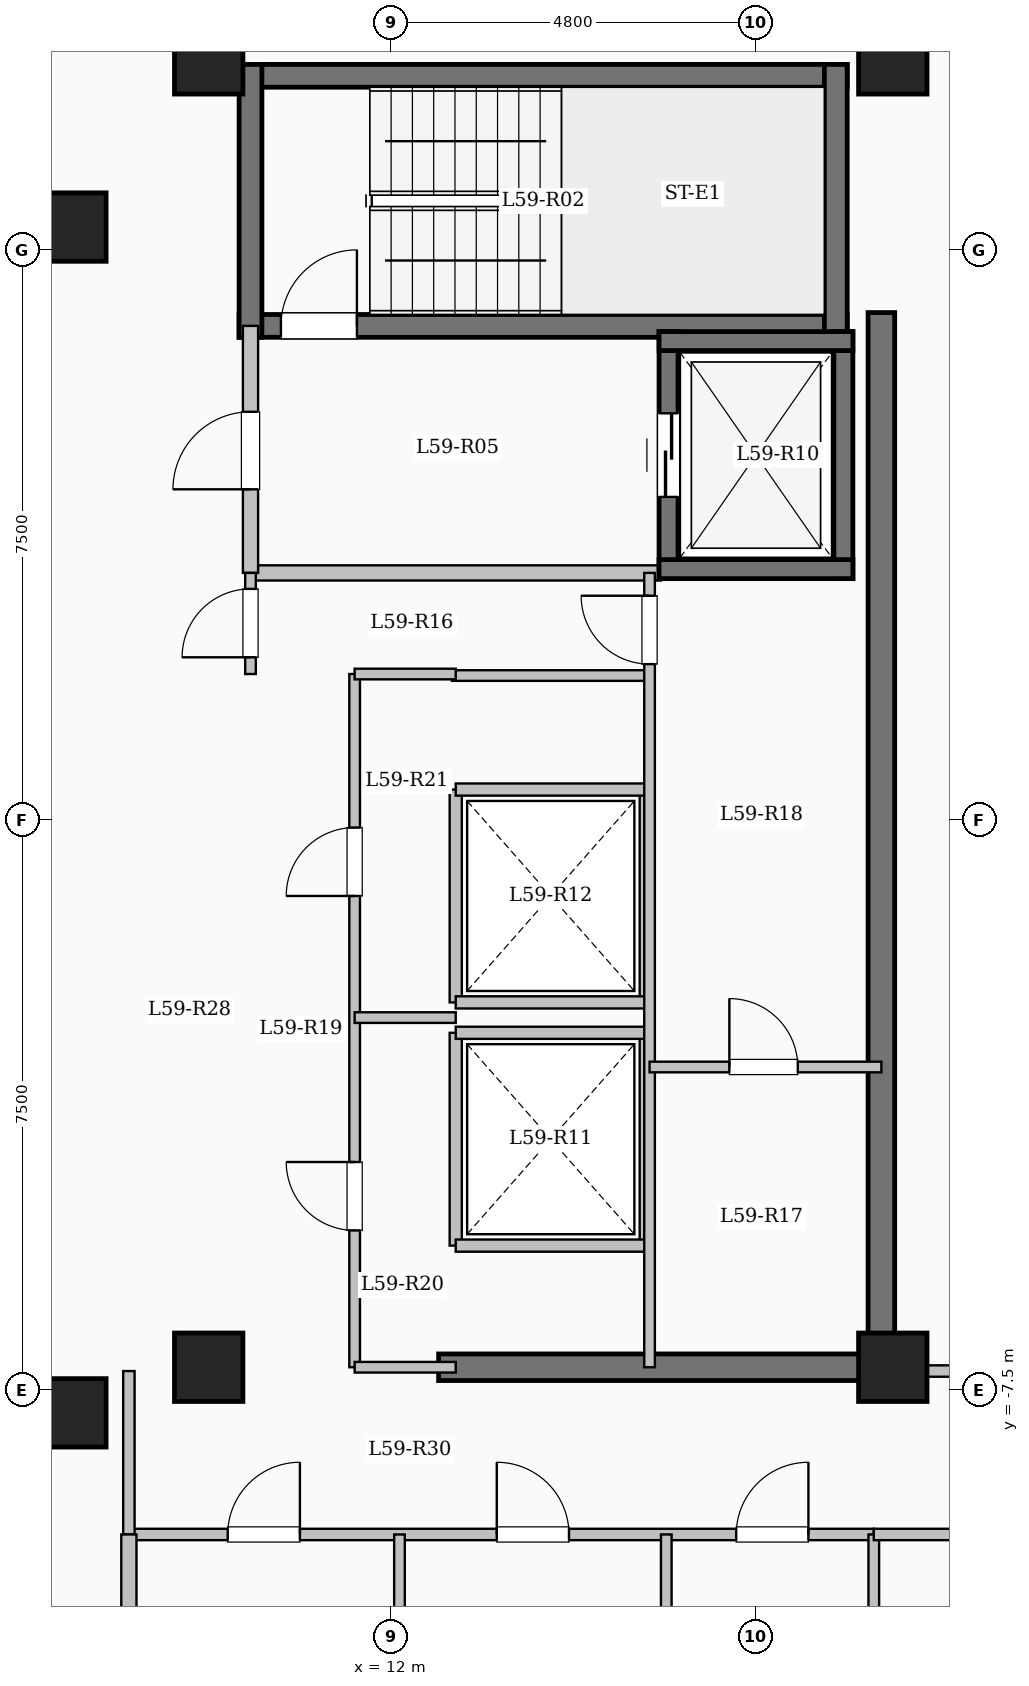
"""IFC4 building model, lengths in metres.
Left out: names, types, materials, properties, quantities, classifications, styles, units other than length and angle.
Written with IfcOpenShell. Run it as: python <this file> out.ifc"""

import sys

from ifc_helpers import new_model, si_unit, direction, frame, frame_2d, origin, origin_2d, place, context, subcontext, project, spatial, rectangle, extrude, element, fill, save


model = new_model("IFC4")
c1 = context("Model", 3, precision=1e-05, world=origin(), true_north=direction((0.0, 1.0)))
c2 = subcontext(c1, "Body", "Model", "MODEL_VIEW")
j1 = project(units=[si_unit("LENGTHUNIT", "METRE"), si_unit("PLANEANGLEUNIT", "RADIAN")], contexts=[c1])
p1 = place(None, origin())
s1 = spatial("IfcSite", under=j1, at=p1, CompositionType="ELEMENT")
p2 = place(p1, origin())
s2 = spatial("IfcBuilding", under=s1, at=p2, CompositionType="ELEMENT")
p3 = place(p2, frame((0.0, 0.0, 217.05)))
s3 = spatial("IfcBuildingStorey", under=s2, at=p3, CompositionType="ELEMENT", Elevation=217.05)
for number, where, z_axis, x_axis in (
    (1, (7.8, -7.8, 0.0), (0.0, 0.0, 1.0), (1.0, 0.0, 0.0)),
    (2, (7.8, 7.8, 0.0), (0.0, 0.0, 1.0), (1.0, 0.0, 0.0)),
    (3, (9.6, -7.2, 0.0), (0.0, 0.0, 1.0), (1.0, 0.0, 0.0)),
    (4, (9.6, 10.0, 0.0), (0.0, 0.0, 1.0), (1.0, 0.0, 0.0)),
    (5, (18.6, -7.2, 0.0), (0.0, 0.0, 1.0), (1.0, 0.0, 0.0)),
    (6, (18.6, 10.0, 0.0), (0.0, 0.0, 1.0), (1.0, 0.0, 0.0)),
):
    element("IfcColumn", number, at=place(p3, frame(where, z_axis=z_axis, x_axis=x_axis)), inside=s3, PredefinedType="COLUMN", context=c2, shape_type="SweptSolid", body=[
        extrude(rectangle(XDim=0.9, YDim=0.9, at=origin_2d()), origin(), (0.0, 0.0, 1.0), 3.35),
    ])
p4 = place(p3, frame((10.0, 9.79, 0.0), z_axis=(0.0, 0.0, 1.0), x_axis=(1.0, 0.0, 0.0)))
e7 = element("IfcWall", 7, at=p4, inside=s3, PredefinedType="SHEAR", context=c2, shape_type="SweptSolid", body=[
    extrude(rectangle(XDim=8.0, YDim=0.3, at=frame_2d((4.0, 0.0))), origin(), (0.0, 0.0, 1.0), 3.35),
])
p5 = place(p3, frame((10.0, 6.5, 0.0), z_axis=(0.0, 0.0, 1.0), x_axis=(1.0, 0.0, 0.0)))
e8 = element("IfcWall", 8, at=p5, inside=s3, PredefinedType="SHEAR", context=c2, shape_type="SweptSolid", body=[
    extrude(rectangle(XDim=8.0, YDim=0.3, at=frame_2d((4.0, 0.0))), origin(), (0.0, 0.0, 1.0), 3.35),
])
p6 = place(p5, frame((0.55, 0.0, 0.0)))
e9 = element("IfcOpeningElement", 9, at=p6, cuts=e8, PredefinedType="OPENING", context=c2, shape_type="SweptSolid", body=[
    extrude(rectangle(XDim=1.0, YDim=2.15, at=frame_2d((0.5, 1.075))), frame((0.0, 0.16, 0.0), z_axis=(0.0, -1.0, 0.0), x_axis=(1.0, 0.0, 0.0)), (0.0, 0.0, 1.0), 0.32),
])
for number, where, z_axis, x_axis in (
    (10, (10.15, 6.35, 0.0), (0.0, 0.0, 1.0), (0.0, 1.0, 0.0)),
    (11, (17.85, 6.35, 0.0), (0.0, 0.0, 1.0), (0.0, 1.0, 0.0)),
):
    element("IfcWall", number, at=place(p3, frame(where, z_axis=z_axis, x_axis=x_axis)), inside=s3, PredefinedType="SHEAR", context=c2, shape_type="SweptSolid", body=[
        extrude(rectangle(XDim=3.59, YDim=0.3, at=frame_2d((1.795, 0.0))), origin(), (0.0, 0.0, 1.0), 3.35),
    ])
p7 = place(p3, frame((10.15, 3.25, 0.0), z_axis=(0.0, 0.0, 1.0), x_axis=(1.0, 0.0, 0.0)))
e12 = element("IfcWall", 12, at=p7, inside=s3, PredefinedType="SOLIDWALL", context=c2, shape_type="SweptSolid", body=[
    extrude(rectangle(XDim=5.4, YDim=0.2, at=frame_2d((2.7, 0.0))), origin(), (0.0, 0.0, 1.0), 3.1),
])
p8 = place(p3, frame((10.15, 3.25, 0.0), z_axis=(0.0, 0.0, 1.0), x_axis=(0.0, 1.0, 0.0)))
e13 = element("IfcWall", 13, at=p8, inside=s3, PredefinedType="SOLIDWALL", context=c2, shape_type="SweptSolid", body=[
    extrude(rectangle(XDim=3.25, YDim=0.2, at=frame_2d((1.625, 0.0))), origin(), (0.0, 0.0, 1.0), 3.1),
])
p9 = place(p8, frame((1.1, 0.0, 0.0)))
e14 = element("IfcOpeningElement", 14, at=p9, cuts=e13, PredefinedType="OPENING", context=c2, shape_type="SweptSolid", body=[
    extrude(rectangle(XDim=1.02, YDim=2.15, at=frame_2d((0.51, 1.075))), frame((0.0, 0.11, 0.0), z_axis=(0.0, -1.0, 0.0), x_axis=(1.0, 0.0, 0.0)), (0.0, 0.0, 1.0), 0.22),
])
p10 = place(p3, frame((15.65, 3.175, 0.0), z_axis=(0.0, 0.0, 1.0), x_axis=(0.0, 1.0, 0.0)))
e15 = element("IfcWall", 15, at=p10, inside=s3, PredefinedType="SHEAR", context=c2, shape_type="SweptSolid", body=[
    extrude(rectangle(XDim=3.25, YDim=0.25, at=frame_2d((1.625, 0.0))), origin(), (0.0, 0.0, 1.0), 3.35),
])
p11 = place(p10, frame((1.075, 0.0, 0.0)))
e16 = element("IfcOpeningElement", 16, at=p11, cuts=e15, PredefinedType="OPENING", context=c2, shape_type="SweptSolid", body=[
    extrude(rectangle(XDim=1.1, YDim=2.15, at=frame_2d((0.55, 1.075))), frame((0.0, 0.135, 0.0), z_axis=(0.0, -1.0, 0.0), x_axis=(1.0, 0.0, 0.0)), (0.0, 0.0, 1.0), 0.27),
])
p12 = place(p3, frame((17.95, 3.175, 0.0), z_axis=(0.0, 0.0, 1.0), x_axis=(0.0, 1.0, 0.0)))
e17 = element("IfcWall", 17, at=p12, inside=s3, PredefinedType="SHEAR", context=c2, shape_type="SweptSolid", body=[
    extrude(rectangle(XDim=3.25, YDim=0.25, at=frame_2d((1.625, 0.0))), origin(), (0.0, 0.0, 1.0), 3.35),
])
for number, where, z_axis, x_axis in (
    (18, (15.525, 3.3, 0.0), (0.0, 0.0, 1.0), (1.0, 0.0, 0.0)),
    (19, (15.525, 6.3, 0.0), (0.0, 0.0, 1.0), (1.0, 0.0, 0.0)),
):
    element("IfcWall", number, at=place(p3, frame(where, z_axis=z_axis, x_axis=x_axis)), inside=s3, PredefinedType="SHEAR", context=c2, shape_type="SweptSolid", body=[
        extrude(rectangle(XDim=2.55, YDim=0.25, at=frame_2d((1.275, 0.0))), origin(), (0.0, 0.0, 1.0), 3.35),
    ])
for number, where, z_axis, x_axis in (
    (20, (12.85, -5.6, 0.0), (0.0, 0.0, 1.0), (0.0, 1.0, 0.0)),
    (21, (15.35, -5.6, 0.0), (0.0, 0.0, 1.0), (0.0, 1.0, 0.0)),
):
    element("IfcWall", number, at=place(p3, frame(where, z_axis=z_axis, x_axis=x_axis)), inside=s3, PredefinedType="SOLIDWALL", context=c2, shape_type="SweptSolid", body=[
        extrude(rectangle(XDim=2.8, YDim=0.16, at=frame_2d((1.4, 0.0))), origin(), (0.0, 0.0, 1.0), 3.1),
    ])
for number, where, z_axis, x_axis in (
    (22, (12.85, -5.6, 0.0), (0.0, 0.0, 1.0), (1.0, 0.0, 0.0)),
    (23, (12.85, -2.8, 0.0), (0.0, 0.0, 1.0), (1.0, 0.0, 0.0)),
):
    element("IfcWall", number, at=place(p3, frame(where, z_axis=z_axis, x_axis=x_axis)), inside=s3, PredefinedType="SOLIDWALL", context=c2, shape_type="SweptSolid", body=[
        extrude(rectangle(XDim=2.5, YDim=0.16, at=frame_2d((1.25, 0.0))), origin(), (0.0, 0.0, 1.0), 3.1),
    ])
for number, where, z_axis, x_axis in (
    (24, (12.85, -2.4, 0.0), (0.0, 0.0, 1.0), (0.0, 1.0, 0.0)),
    (25, (15.35, -2.4, 0.0), (0.0, 0.0, 1.0), (0.0, 1.0, 0.0)),
):
    element("IfcWall", number, at=place(p3, frame(where, z_axis=z_axis, x_axis=x_axis)), inside=s3, PredefinedType="SOLIDWALL", context=c2, shape_type="SweptSolid", body=[
        extrude(rectangle(XDim=2.8, YDim=0.16, at=frame_2d((1.4, 0.0))), origin(), (0.0, 0.0, 1.0), 3.1),
    ])
for number, where, z_axis, x_axis in (
    (26, (12.85, -2.4, 0.0), (0.0, 0.0, 1.0), (1.0, 0.0, 0.0)),
    (27, (12.85, 0.4, 0.0), (0.0, 0.0, 1.0), (1.0, 0.0, 0.0)),
):
    element("IfcWall", number, at=place(p3, frame(where, z_axis=z_axis, x_axis=x_axis)), inside=s3, PredefinedType="SOLIDWALL", context=c2, shape_type="SweptSolid", body=[
        extrude(rectangle(XDim=2.5, YDim=0.16, at=frame_2d((1.25, 0.0))), origin(), (0.0, 0.0, 1.0), 3.1),
    ])
p13 = place(p3, frame((18.45, -7.375, 0.0), z_axis=(0.0, 0.0, 1.0), x_axis=(0.0, 1.0, 0.0)))
e28 = element("IfcWall", 28, at=p13, inside=s3, PredefinedType="SHEAR", context=c2, shape_type="SweptSolid", body=[
    extrude(rectangle(XDim=14.05, YDim=0.35, at=frame_2d((7.025, 0.0))), origin(), (0.0, 0.0, 1.0), 3.35),
])
p14 = place(p3, frame((12.625, -7.2, 0.0), z_axis=(0.0, 0.0, 1.0), x_axis=(1.0, 0.0, 0.0)))
e29 = element("IfcWall", 29, at=p14, inside=s3, PredefinedType="SHEAR", context=c2, shape_type="SweptSolid", body=[
    extrude(rectangle(XDim=6.0, YDim=0.35, at=frame_2d((3.0, 0.0))), origin(), (0.0, 0.0, 1.0), 3.35),
])
p15 = place(p3, frame((12.8, 1.9, 0.0), z_axis=(0.0, 0.0, 1.0), x_axis=(1.0, 0.0, 0.0)))
e30 = element("IfcWall", 30, at=p15, inside=s3, PredefinedType="PARTITIONING", context=c2, shape_type="SweptSolid", body=[
    extrude(rectangle(XDim=2.6, YDim=0.14, at=frame_2d((1.3, 0.0))), origin(), (0.0, 0.0, 1.0), 3.1),
])
p16 = place(p3, frame((10.15, 1.92, 0.0), z_axis=(0.0, 0.0, 1.0), x_axis=(0.0, 1.0, 0.0)))
e31 = element("IfcWall", 31, at=p16, inside=s3, PredefinedType="PARTITIONING", context=c2, shape_type="SweptSolid", body=[
    extrude(rectangle(XDim=1.33, YDim=0.14, at=frame_2d((0.665, 0.0))), origin(), (0.0, 0.0, 1.0), 3.1),
])
p17 = place(p16, frame((0.22, 0.0, 0.0)))
e32 = element("IfcOpeningElement", 32, at=p17, cuts=e31, PredefinedType="OPENING", context=c2, shape_type="SweptSolid", body=[
    extrude(rectangle(XDim=0.9, YDim=2.08, at=frame_2d((0.45, 1.04))), frame((0.0, 0.08, 0.0), z_axis=(0.0, -1.0, 0.0), x_axis=(1.0, 0.0, 0.0)), (0.0, 0.0, 1.0), 0.16),
])
p18 = place(p3, frame((15.4, -7.2, 0.0), z_axis=(0.0, 0.0, 1.0), x_axis=(0.0, 1.0, 0.0)))
e33 = element("IfcWall", 33, at=p18, inside=s3, PredefinedType="PARTITIONING", context=c2, shape_type="SweptSolid", body=[
    extrude(rectangle(XDim=10.45, YDim=0.14, at=frame_2d((5.225, 0.0))), origin(), (0.0, 0.0, 1.0), 3.1),
])
p19 = place(p18, frame((9.25, 0.0, 0.0)))
e34 = element("IfcOpeningElement", 34, at=p19, cuts=e33, PredefinedType="OPENING", context=c2, shape_type="SweptSolid", body=[
    extrude(rectangle(XDim=0.9, YDim=2.08, at=frame_2d((0.45, 1.04))), frame((0.0, 0.08, 0.0), z_axis=(0.0, -1.0, 0.0), x_axis=(1.0, 0.0, 0.0)), (0.0, 0.0, 1.0), 0.16),
])
p20 = place(p3, frame((15.4, -3.25, 0.0), z_axis=(0.0, 0.0, 1.0), x_axis=(1.0, 0.0, 0.0)))
e35 = element("IfcWall", 35, at=p20, inside=s3, PredefinedType="PARTITIONING", context=c2, shape_type="SweptSolid", body=[
    extrude(rectangle(XDim=3.05, YDim=0.14, at=frame_2d((1.525, 0.0))), origin(), (0.0, 0.0, 1.0), 3.1),
])
p21 = place(p20, frame((1.05, 0.0, 0.0)))
e36 = element("IfcOpeningElement", 36, at=p21, cuts=e35, PredefinedType="OPENING", context=c2, shape_type="SweptSolid", body=[
    extrude(rectangle(XDim=0.9, YDim=2.08, at=frame_2d((0.45, 1.04))), frame((0.0, 0.08, 0.0), z_axis=(0.0, -1.0, 0.0), x_axis=(1.0, 0.0, 0.0)), (0.0, 0.0, 1.0), 0.16),
])
p22 = place(p3, frame((11.52, -7.2, 0.0), z_axis=(0.0, 0.0, 1.0), x_axis=(0.0, 1.0, 0.0)))
e37 = element("IfcWall", 37, at=p22, inside=s3, PredefinedType="PARTITIONING", context=c2, shape_type="SweptSolid", body=[
    extrude(rectangle(XDim=9.12, YDim=0.14, at=frame_2d((4.56, 0.0))), origin(), (0.0, 0.0, 1.0), 3.1),
])
p23 = place(p22, frame((1.8, 0.0, 0.0)))
e38 = element("IfcOpeningElement", 38, at=p23, cuts=e37, PredefinedType="OPENING", context=c2, shape_type="SweptSolid", body=[
    extrude(rectangle(XDim=0.9, YDim=2.08, at=frame_2d((0.45, 1.04))), frame((0.0, 0.08, 0.0), z_axis=(0.0, -1.0, 0.0), x_axis=(1.0, 0.0, 0.0)), (0.0, 0.0, 1.0), 0.16),
])
p24 = place(p22, frame((6.2, 0.0, 0.0)))
e39 = element("IfcOpeningElement", 39, at=p24, cuts=e37, PredefinedType="OPENING", context=c2, shape_type="SweptSolid", body=[
    extrude(rectangle(XDim=0.9, YDim=2.08, at=frame_2d((0.45, 1.04))), frame((0.0, 0.08, 0.0), z_axis=(0.0, -1.0, 0.0), x_axis=(1.0, 0.0, 0.0)), (0.0, 0.0, 1.0), 0.16),
])
p25 = place(p3, frame((11.52, 1.92, 0.0), z_axis=(0.0, 0.0, 1.0), x_axis=(1.0, 0.0, 0.0)))
e40 = element("IfcWall", 40, at=p25, inside=s3, PredefinedType="PARTITIONING", context=c2, shape_type="SweptSolid", body=[
    extrude(rectangle(XDim=1.33, YDim=0.14, at=frame_2d((0.665, 0.0))), origin(), (0.0, 0.0, 1.0), 3.1),
])
p26 = place(p3, frame((11.52, -7.2, 0.0), z_axis=(0.0, 0.0, 1.0), x_axis=(1.0, 0.0, 0.0)))
e41 = element("IfcWall", 41, at=p26, inside=s3, PredefinedType="PARTITIONING", context=c2, shape_type="SweptSolid", body=[
    extrude(rectangle(XDim=1.33, YDim=0.14, at=frame_2d((0.665, 0.0))), origin(), (0.0, 0.0, 1.0), 2.235),
])
p27 = place(p3, frame((11.52, -2.6, 0.0), z_axis=(0.0, 0.0, 1.0), x_axis=(1.0, 0.0, 0.0)))
e42 = element("IfcWall", 42, at=p27, inside=s3, PredefinedType="PARTITIONING", context=c2, shape_type="SweptSolid", body=[
    extrude(rectangle(XDim=1.33, YDim=0.14, at=frame_2d((0.665, 0.0))), origin(), (0.0, 0.0, 1.0), 3.1),
])
p28 = place(p3, frame((8.55, -9.4, 0.0), z_axis=(0.0, 0.0, 1.0), x_axis=(1.0, 0.0, 0.0)))
e43 = element("IfcWall", 43, at=p28, inside=s3, PredefinedType="PARTITIONING", context=c2, shape_type="SweptSolid", body=[
    extrude(rectangle(XDim=9.8, YDim=0.15, at=frame_2d((4.9, 0.0))), origin(), (0.0, 0.0, 1.0), 3.1),
])
p29 = place(p28, frame((1.3, 0.0, 0.0)))
e44 = element("IfcOpeningElement", 44, at=p29, cuts=e43, PredefinedType="OPENING", context=c2, shape_type="SweptSolid", body=[
    extrude(rectangle(XDim=0.95, YDim=2.15, at=frame_2d((0.475, 1.075))), frame((0.0, 0.085, 0.0), z_axis=(0.0, -1.0, 0.0), x_axis=(1.0, 0.0, 0.0)), (0.0, 0.0, 1.0), 0.17),
])
p30 = place(p28, frame((4.84, 0.0, 0.0)))
e45 = element("IfcOpeningElement", 45, at=p30, cuts=e43, PredefinedType="OPENING", context=c2, shape_type="SweptSolid", body=[
    extrude(rectangle(XDim=0.95, YDim=2.15, at=frame_2d((0.475, 1.075))), frame((0.0, 0.085, 0.0), z_axis=(0.0, -1.0, 0.0), x_axis=(1.0, 0.0, 0.0)), (0.0, 0.0, 1.0), 0.17),
])
p31 = place(p28, frame((7.99, 0.0, 0.0)))
e46 = element("IfcOpeningElement", 46, at=p31, cuts=e43, PredefinedType="OPENING", context=c2, shape_type="SweptSolid", body=[
    extrude(rectangle(XDim=0.95, YDim=2.15, at=frame_2d((0.475, 1.075))), frame((0.0, 0.085, 0.0), z_axis=(0.0, -1.0, 0.0), x_axis=(1.0, 0.0, 0.0)), (0.0, 0.0, 1.0), 0.17),
])
p32 = place(p3, frame((8.55, -9.4, 0.0), z_axis=(0.0, 0.0, 1.0), x_axis=(0.0, 1.0, 0.0)))
e47 = element("IfcWall", 47, at=p32, inside=s3, PredefinedType="PARTITIONING", context=c2, shape_type="SweptSolid", body=[
    extrude(rectangle(XDim=2.15, YDim=0.15, at=frame_2d((1.075, 0.0))), origin(), (0.0, 0.0, 1.0), 3.1),
])
for number, where, z_axis, x_axis in (
    (48, (12.11, -20.85, 0.0), (0.0, 0.0, 1.0), (0.0, 1.0, 0.0)),
    (49, (15.62, -20.85, 0.0), (0.0, 0.0, 1.0), (0.0, 1.0, 0.0)),
):
    element("IfcWall", number, at=place(p3, frame(where, z_axis=z_axis, x_axis=x_axis)), inside=s3, PredefinedType="PARTITIONING", context=c2, shape_type="SweptSolid", body=[
        extrude(rectangle(XDim=11.45, YDim=0.14, at=frame_2d((5.725, 0.0))), origin(), (0.0, 0.0, 1.0), 3.1),
    ])
p33 = place(p3, frame((8.55, -21.504, 0.0), z_axis=(0.0, 0.0, 1.0), x_axis=(0.0, 1.0, 0.0)))
e50 = element("IfcWall", 50, at=p33, inside=s3, PredefinedType="SOLIDWALL", context=c2, shape_type="SweptSolid", body=[
    extrude(rectangle(XDim=12.104, YDim=0.2, at=frame_2d((6.052, 0.0))), origin(), (0.0, 0.0, 1.0), 3.1),
])
p34 = place(p3, frame((18.45, -7.25, 0.0), z_axis=(0.0, 0.0, 1.0), x_axis=(1.0, 0.0, 0.0)))
e51 = element("IfcWall", 51, at=p34, inside=s3, PredefinedType="PARTITIONING", context=c2, shape_type="SweptSolid", body=[
    extrude(rectangle(XDim=5.13, YDim=0.15, at=frame_2d((2.565, 0.0))), origin(), (0.0, 0.0, 1.0), 3.1),
])
p35 = place(p34, frame((1.95, 0.0, 0.0)))
e52 = element("IfcOpeningElement", 52, at=p35, cuts=e51, PredefinedType="OPENING", context=c2, shape_type="SweptSolid", body=[
    extrude(rectangle(XDim=1.08, YDim=2.15, at=frame_2d((0.54, 1.075))), frame((0.0, 0.085, 0.0), z_axis=(0.0, -1.0, 0.0), x_axis=(1.0, 0.0, 0.0)), (0.0, 0.0, 1.0), 0.17),
])
p36 = place(p3, frame((18.35, -17.25, 0.0), z_axis=(0.0, 0.0, 1.0), x_axis=(0.0, 1.0, 0.0)))
e53 = element("IfcWall", 53, at=p36, inside=s3, PredefinedType="PARTITIONING", context=c2, shape_type="SweptSolid", body=[
    extrude(rectangle(XDim=7.85, YDim=0.14, at=frame_2d((3.925, 0.0))), origin(), (0.0, 0.0, 1.0), 3.1),
])
p37 = place(p3, frame((18.35, -9.4, 0.0), z_axis=(0.0, 0.0, 1.0), x_axis=(1.0, 0.0, 0.0)))
e54 = element("IfcWall", 54, at=p37, inside=s3, PredefinedType="PARTITIONING", context=c2, shape_type="SweptSolid", body=[
    extrude(rectangle(XDim=5.23, YDim=0.15, at=frame_2d((2.615, 0.0))), origin(), (0.0, 0.0, 1.0), 3.1),
])
p38 = place(p37, frame((2.14, 0.0, 0.0)))
e55 = element("IfcOpeningElement", 55, at=p38, cuts=e54, PredefinedType="OPENING", context=c2, shape_type="SweptSolid", body=[
    extrude(rectangle(XDim=0.95, YDim=2.15, at=frame_2d((0.475, 1.075))), frame((0.0, 0.085, 0.0), z_axis=(0.0, -1.0, 0.0), x_axis=(1.0, 0.0, 0.0)), (0.0, 0.0, 1.0), 0.17),
])
p39 = place(p6, origin())
e56 = element("IfcDoor", 56, at=p39, inside=s3, OperationType="SINGLE_SWING_RIGHT", PredefinedType="DOOR", context=c2, shape_type="SweptSolid", body=[
    extrude(rectangle(XDim=1.0, YDim=2.15, at=frame_2d((0.5, 1.075))), frame((0.0, 0.025, 0.0), z_axis=(0.0, -1.0, 0.0), x_axis=(1.0, 0.0, 0.0)), (0.0, 0.0, 1.0), 0.05),
])
fill(e9, e56)
p40 = place(p9, origin())
e57 = element("IfcDoor", 57, at=p40, inside=s3, OperationType="SINGLE_SWING_LEFT", PredefinedType="DOOR", context=c2, shape_type="SweptSolid", body=[
    extrude(rectangle(XDim=1.02, YDim=2.15, at=frame_2d((0.51, 1.075))), frame((0.0, 0.025, 0.0), z_axis=(0.0, -1.0, 0.0), x_axis=(1.0, 0.0, 0.0)), (0.0, 0.0, 1.0), 0.05),
])
fill(e14, e57)
p41 = place(p11, origin())
e58 = element("IfcDoor", 58, at=p41, inside=s3, OperationType="SLIDING_TO_LEFT", PredefinedType="DOOR", context=c2, shape_type="SweptSolid", body=[
    extrude(rectangle(XDim=1.1, YDim=2.15, at=frame_2d((0.55, 1.075))), frame((0.0, 0.025, 0.0), z_axis=(0.0, -1.0, 0.0), x_axis=(1.0, 0.0, 0.0)), (0.0, 0.0, 1.0), 0.05),
])
fill(e16, e58)
p42 = place(p17, origin())
e59 = element("IfcDoor", 59, at=p42, inside=s3, OperationType="SINGLE_SWING_LEFT", PredefinedType="DOOR", context=c2, shape_type="SweptSolid", body=[
    extrude(rectangle(XDim=0.9, YDim=2.08, at=frame_2d((0.45, 1.04))), frame((0.0, 0.025, 0.0), z_axis=(0.0, -1.0, 0.0), x_axis=(1.0, 0.0, 0.0)), (0.0, 0.0, 1.0), 0.05),
])
fill(e32, e59)
p43 = place(p19, origin())
e60 = element("IfcDoor", 60, at=p43, inside=s3, OperationType="SINGLE_SWING_RIGHT", PredefinedType="DOOR", context=c2, shape_type="SweptSolid", body=[
    extrude(rectangle(XDim=0.9, YDim=2.08, at=frame_2d((0.45, 1.04))), frame((0.0, 0.025, 0.0), z_axis=(0.0, -1.0, 0.0), x_axis=(1.0, 0.0, 0.0)), (0.0, 0.0, 1.0), 0.05),
])
fill(e34, e60)
p44 = place(p21, origin())
e61 = element("IfcDoor", 61, at=p44, inside=s3, OperationType="SINGLE_SWING_LEFT", PredefinedType="DOOR", context=c2, shape_type="SweptSolid", body=[
    extrude(rectangle(XDim=0.9, YDim=2.08, at=frame_2d((0.45, 1.04))), frame((0.0, 0.025, 0.0), z_axis=(0.0, -1.0, 0.0), x_axis=(1.0, 0.0, 0.0)), (0.0, 0.0, 1.0), 0.05),
])
fill(e36, e61)
p45 = place(p23, origin())
e62 = element("IfcDoor", 62, at=p45, inside=s3, OperationType="SINGLE_SWING_RIGHT", PredefinedType="DOOR", context=c2, shape_type="SweptSolid", body=[
    extrude(rectangle(XDim=0.9, YDim=2.08, at=frame_2d((0.45, 1.04))), frame((0.0, 0.025, 0.0), z_axis=(0.0, -1.0, 0.0), x_axis=(1.0, 0.0, 0.0)), (0.0, 0.0, 1.0), 0.05),
])
fill(e38, e62)
p46 = place(p24, origin())
e63 = element("IfcDoor", 63, at=p46, inside=s3, OperationType="SINGLE_SWING_LEFT", PredefinedType="DOOR", context=c2, shape_type="SweptSolid", body=[
    extrude(rectangle(XDim=0.9, YDim=2.08, at=frame_2d((0.45, 1.04))), frame((0.0, 0.025, 0.0), z_axis=(0.0, -1.0, 0.0), x_axis=(1.0, 0.0, 0.0)), (0.0, 0.0, 1.0), 0.05),
])
fill(e39, e63)
p47 = place(p29, origin())
e64 = element("IfcDoor", 64, at=p47, inside=s3, OperationType="SINGLE_SWING_RIGHT", PredefinedType="DOOR", context=c2, shape_type="SweptSolid", body=[
    extrude(rectangle(XDim=0.95, YDim=2.15, at=frame_2d((0.475, 1.075))), frame((0.0, 0.025, 0.0), z_axis=(0.0, -1.0, 0.0), x_axis=(1.0, 0.0, 0.0)), (0.0, 0.0, 1.0), 0.05),
])
fill(e44, e64)
p48 = place(p30, origin())
e65 = element("IfcDoor", 65, at=p48, inside=s3, OperationType="SINGLE_SWING_LEFT", PredefinedType="DOOR", context=c2, shape_type="SweptSolid", body=[
    extrude(rectangle(XDim=0.95, YDim=2.15, at=frame_2d((0.475, 1.075))), frame((0.0, 0.025, 0.0), z_axis=(0.0, -1.0, 0.0), x_axis=(1.0, 0.0, 0.0)), (0.0, 0.0, 1.0), 0.05),
])
fill(e45, e65)
p49 = place(p31, origin())
e66 = element("IfcDoor", 66, at=p49, inside=s3, OperationType="SINGLE_SWING_RIGHT", PredefinedType="DOOR", context=c2, shape_type="SweptSolid", body=[
    extrude(rectangle(XDim=0.95, YDim=2.15, at=frame_2d((0.475, 1.075))), frame((0.0, 0.025, 0.0), z_axis=(0.0, -1.0, 0.0), x_axis=(1.0, 0.0, 0.0)), (0.0, 0.0, 1.0), 0.05),
])
fill(e46, e66)
save(model, sys.argv[1])
